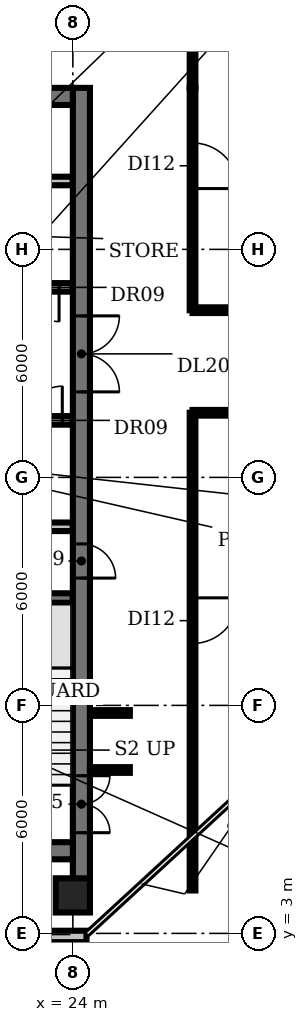
"""IFC4 building model, lengths in metres.
Left out: names, types, materials, properties, quantities, classifications, styles, units other than length and angle.
Written with IfcOpenShell. Run it as: python <this file> out.ifc"""

import sys

from ifc_helpers import new_model, si_unit, direction, frame, frame_2d, origin, origin_2d, place, context, subcontext, project, spatial, rectangle, circle, extrude, element, fill, save


model = new_model("IFC4")
c1 = context("Model", 3, precision=1e-05, world=origin(), true_north=direction((0.0, 1.0)))
c2 = subcontext(c1, "Body", "Model", "MODEL_VIEW")
j1 = project(units=[si_unit("LENGTHUNIT", "METRE"), si_unit("PLANEANGLEUNIT", "RADIAN")], contexts=[c1])
p1 = place(None, origin())
s1 = spatial("IfcSite", under=j1, at=p1, CompositionType="ELEMENT")
p2 = place(p1, origin())
s2 = spatial("IfcBuilding", under=s1, at=p2, CompositionType="ELEMENT")
p3 = place(p2, frame((0.0, 0.0, 209.6)))
s3 = spatial("IfcBuildingStorey", under=s2, at=p3, CompositionType="ELEMENT", Elevation=209.6)
p4 = place(p3, frame((24.0, 4.0, 0.0), z_axis=(0.0, 0.0, 1.0), x_axis=(1.0, 0.0, 0.0)))
e1 = element("IfcColumn", 1, at=p4, inside=s3, PredefinedType="COLUMN", context=c2, shape_type="SweptSolid", body=[
    extrude(circle(Radius=0.45, at=origin_2d()), origin(), (0.0, 0.0, 1.0), 3.8),
])
p5 = place(p3, frame((15.866, 2.92, 0.0), z_axis=(0.0, 0.0, 1.0), x_axis=(1.0, 0.0, 0.0)))
e2 = element("IfcWall", 2, at=p5, inside=s3, PredefinedType="SOLIDWALL", context=c2, shape_type="SweptSolid", body=[
    extrude(rectangle(XDim=8.493, YDim=0.3, at=frame_2d((4.246, 0.0))), origin(), (0.0, 0.0, 1.0), 3.8),
])
p6 = place(p3, frame((20.85, 11.825, 0.0), z_axis=(0.0, 0.0, 1.0), x_axis=(1.0, 0.0, 0.0)))
e3 = element("IfcWall", 3, at=p6, inside=s3, PredefinedType="SHEAR", context=c2, shape_type="SweptSolid", body=[
    extrude(rectangle(XDim=3.15, YDim=0.25, at=frame_2d((1.575, 0.0))), origin(), (0.0, 0.0, 1.0), 3.8),
])
p7 = place(p3, frame((16.6, 13.7, 0.0), z_axis=(0.0, 0.0, 1.0), x_axis=(1.0, 0.0, 0.0)))
e4 = element("IfcWall", 4, at=p7, inside=s3, PredefinedType="PARTITIONING", context=c2, shape_type="SweptSolid", body=[
    extrude(rectangle(XDim=7.4, YDim=0.225, at=frame_2d((3.7, 0.0))), origin(), (0.0, 0.0, 1.0), 3.8),
])
p8 = place(p3, frame((9.4, 16.5, 0.0), z_axis=(0.0, 0.0, 1.0), x_axis=(1.0, 0.0, 0.0)))
e5 = element("IfcWall", 5, at=p8, inside=s3, PredefinedType="PARTITIONING", context=c2, shape_type="SweptSolid", body=[
    extrude(rectangle(XDim=14.6, YDim=0.225, at=frame_2d((7.3, 0.0))), origin(), (0.0, 0.0, 1.0), 3.8),
])
p9 = place(p8, frame((0.55, 0.0, 0.0)))
e6 = element("IfcOpeningElement", 6, at=p9, cuts=e5, PredefinedType="OPENING", context=c2, shape_type="SweptSolid", body=[
    extrude(rectangle(XDim=0.9, YDim=2.1, at=frame_2d((0.45, 1.05))), frame((0.0, 0.123, 0.0), z_axis=(0.0, -1.0, 0.0), x_axis=(1.0, 0.0, 0.0)), (0.0, 0.0, 1.0), 0.245),
])
p10 = place(p8, frame((6.075, 0.0, 0.0)))
e7 = element("IfcOpeningElement", 7, at=p10, cuts=e5, PredefinedType="OPENING", context=c2, shape_type="SweptSolid", body=[
    extrude(rectangle(XDim=1.0, YDim=2.1, at=frame_2d((0.5, 1.05))), frame((0.0, 0.123, 0.0), z_axis=(0.0, -1.0, 0.0), x_axis=(1.0, 0.0, 0.0)), (0.0, 0.0, 1.0), 0.245),
])
p11 = place(p8, frame((11.647, 0.0, 0.0)))
e8 = element("IfcOpeningElement", 8, at=p11, cuts=e5, PredefinedType="OPENING", context=c2, shape_type="SweptSolid", body=[
    extrude(rectangle(XDim=0.9, YDim=2.1, at=frame_2d((0.45, 1.05))), frame((0.0, 0.123, 0.0), z_axis=(0.0, -1.0, 0.0), x_axis=(1.0, 0.0, 0.0)), (0.0, 0.0, 1.0), 0.245),
])
p12 = place(p8, frame((13.423, 0.0, 0.0)))
e9 = element("IfcOpeningElement", 9, at=p12, cuts=e5, PredefinedType="OPENING", context=c2, shape_type="SweptSolid", body=[
    extrude(rectangle(XDim=0.9, YDim=2.1, at=frame_2d((0.45, 1.05))), frame((0.0, 0.123, 0.0), z_axis=(0.0, -1.0, 0.0), x_axis=(1.0, 0.0, 0.0)), (0.0, 0.0, 1.0), 0.245),
])
p13 = place(p3, frame((24.0, 20.0, 0.0), z_axis=(0.0, 0.0, 1.0), x_axis=(-1.0, 0.0, 0.0)))
e10 = element("IfcWall", 10, at=p13, inside=s3, PredefinedType="PARTITIONING", context=c2, shape_type="SweptSolid", body=[
    extrude(rectangle(XDim=14.6, YDim=0.225, at=frame_2d((7.3, 0.0))), origin(), (0.0, 0.0, 1.0), 3.8),
])
p14 = place(p13, frame((12.75, 0.0, 0.0)))
e11 = element("IfcOpeningElement", 11, at=p14, cuts=e10, PredefinedType="OPENING", context=c2, shape_type="SweptSolid", body=[
    extrude(rectangle(XDim=1.1, YDim=2.1, at=frame_2d((0.55, 1.05))), frame((0.0, 0.123, 0.0), z_axis=(0.0, -1.0, 0.0), x_axis=(1.0, 0.0, 0.0)), (0.0, 0.0, 1.0), 0.245),
])
p15 = place(p13, frame((9.95, 0.0, 0.0)))
e12 = element("IfcOpeningElement", 12, at=p15, cuts=e10, PredefinedType="OPENING", context=c2, shape_type="SweptSolid", body=[
    extrude(rectangle(XDim=1.1, YDim=2.1, at=frame_2d((0.55, 1.05))), frame((0.0, 0.123, 0.0), z_axis=(0.0, -1.0, 0.0), x_axis=(1.0, 0.0, 0.0)), (0.0, 0.0, 1.0), 0.245),
])
p16 = place(p13, frame((7.15, 0.0, 0.0)))
e13 = element("IfcOpeningElement", 13, at=p16, cuts=e10, PredefinedType="OPENING", context=c2, shape_type="SweptSolid", body=[
    extrude(rectangle(XDim=1.1, YDim=2.1, at=frame_2d((0.55, 1.05))), frame((0.0, 0.123, 0.0), z_axis=(0.0, -1.0, 0.0), x_axis=(1.0, 0.0, 0.0)), (0.0, 0.0, 1.0), 0.245),
])
p17 = place(p13, frame((4.35, 0.0, 0.0)))
e14 = element("IfcOpeningElement", 14, at=p17, cuts=e10, PredefinedType="OPENING", context=c2, shape_type="SweptSolid", body=[
    extrude(rectangle(XDim=1.1, YDim=2.1, at=frame_2d((0.55, 1.05))), frame((0.0, 0.123, 0.0), z_axis=(0.0, -1.0, 0.0), x_axis=(1.0, 0.0, 0.0)), (0.0, 0.0, 1.0), 0.245),
])
p18 = place(p13, frame((2.137, 0.0, 0.0)))
e15 = element("IfcOpeningElement", 15, at=p18, cuts=e10, PredefinedType="OPENING", context=c2, shape_type="SweptSolid", body=[
    extrude(rectangle(XDim=0.9, YDim=2.1, at=frame_2d((0.45, 1.05))), frame((0.0, 0.123, 0.0), z_axis=(0.0, -1.0, 0.0), x_axis=(1.0, 0.0, 0.0)), (0.0, 0.0, 1.0), 0.245),
])
p19 = place(p13, frame((0.363, 0.0, 0.0)))
e16 = element("IfcOpeningElement", 16, at=p19, cuts=e10, PredefinedType="OPENING", context=c2, shape_type="SweptSolid", body=[
    extrude(rectangle(XDim=0.9, YDim=2.1, at=frame_2d((0.45, 1.05))), frame((0.0, 0.123, 0.0), z_axis=(0.0, -1.0, 0.0), x_axis=(1.0, 0.0, 0.0)), (0.0, 0.0, 1.0), 0.245),
])
p20 = place(p3, frame((9.4, 22.8, 0.0), z_axis=(0.0, 0.0, 1.0), x_axis=(1.0, 0.0, 0.0)))
e17 = element("IfcWall", 17, at=p20, inside=s3, PredefinedType="PARTITIONING", context=c2, shape_type="SweptSolid", body=[
    extrude(rectangle(XDim=14.6, YDim=0.225, at=frame_2d((7.3, 0.0))), origin(), (0.0, 0.0, 1.0), 3.8),
])
p21 = place(p3, frame((24.225, 25.25, 0.0), z_axis=(0.0, 0.0, 1.0), x_axis=(0.0, -1.0, 0.0)))
e18 = element("IfcWall", 18, at=p21, inside=s3, PredefinedType="SHEAR", context=c2, shape_type="SweptSolid", body=[
    extrude(rectangle(XDim=20.83, YDim=0.45, at=frame_2d((10.415, 0.0))), origin(), (0.0, 0.0, 1.0), 3.8),
])
p22 = place(p21, frame((18.1, 0.0, 0.0)))
e19 = element("IfcOpeningElement", 19, at=p22, cuts=e18, PredefinedType="OPENING", context=c2, shape_type="SweptSolid", body=[
    extrude(rectangle(XDim=1.5, YDim=2.1, at=frame_2d((0.75, 1.05))), frame((0.0, 0.235, 0.0), z_axis=(0.0, -1.0, 0.0), x_axis=(1.0, 0.0, 0.0)), (0.0, 0.0, 1.0), 0.47),
])
p23 = place(p21, frame((12.0, 0.0, 0.0)))
e20 = element("IfcOpeningElement", 20, at=p23, cuts=e18, PredefinedType="OPENING", context=c2, shape_type="SweptSolid", body=[
    extrude(rectangle(XDim=0.9, YDim=2.1, at=frame_2d((0.45, 1.05))), frame((0.0, 0.235, 0.0), z_axis=(0.0, -1.0, 0.0), x_axis=(1.0, 0.0, 0.0)), (0.0, 0.0, 1.0), 0.47),
])
p24 = place(p21, frame((6.0, 0.0, 0.0)))
e21 = element("IfcOpeningElement", 21, at=p24, cuts=e18, PredefinedType="OPENING", context=c2, shape_type="SweptSolid", body=[
    extrude(rectangle(XDim=2.0, YDim=2.1, at=frame_2d((1.0, 1.05))), frame((0.0, 0.235, 0.0), z_axis=(0.0, -1.0, 0.0), x_axis=(1.0, 0.0, 0.0)), (0.0, 0.0, 1.0), 0.47),
])
p25 = place(p3, frame((24.0, 5.175, 0.0), z_axis=(0.0, 0.0, 1.0), x_axis=(-1.0, 0.0, 0.0)))
e22 = element("IfcWall", 22, at=p25, inside=s3, PredefinedType="SHEAR", context=c2, shape_type="SweptSolid", body=[
    extrude(rectangle(XDim=18.0, YDim=0.45, at=frame_2d((9.0, 0.0))), origin(), (0.0, 0.0, 1.0), 3.8),
])
p26 = place(p25, frame((0.825, 0.0, 0.0)))
e23 = element("IfcOpeningElement", 23, at=p26, cuts=e22, PredefinedType="OPENING", context=c2, shape_type="SweptSolid", body=[
    extrude(rectangle(XDim=1.5, YDim=2.1, at=frame_2d((0.75, 1.05))), frame((0.0, 0.235, 0.0), z_axis=(0.0, -1.0, 0.0), x_axis=(1.0, 0.0, 0.0)), (0.0, 0.0, 1.0), 0.47),
])
p27 = place(p25, frame((15.675, 0.0, 0.0)))
e24 = element("IfcOpeningElement", 24, at=p27, cuts=e22, PredefinedType="OPENING", context=c2, shape_type="SweptSolid", body=[
    extrude(rectangle(XDim=1.5, YDim=2.1, at=frame_2d((0.75, 1.05))), frame((0.0, 0.235, 0.0), z_axis=(0.0, -1.0, 0.0), x_axis=(1.0, 0.0, 0.0)), (0.0, 0.0, 1.0), 0.47),
])
p28 = place(p25, frame((13.0, 0.0, 0.0)))
e25 = element("IfcOpeningElement", 25, at=p28, cuts=e22, PredefinedType="OPENING", context=c2, shape_type="SweptSolid", body=[
    extrude(rectangle(XDim=1.2, YDim=2.1, at=frame_2d((0.6, 1.05))), frame((0.0, 0.235, 0.0), z_axis=(0.0, -1.0, 0.0), x_axis=(1.0, 0.0, 0.0)), (0.0, 0.0, 1.0), 0.47),
])
p29 = place(p25, frame((4.4, 0.0, 0.0)))
e26 = element("IfcOpeningElement", 26, at=p29, cuts=e22, PredefinedType="OPENING", context=c2, shape_type="SweptSolid", body=[
    extrude(rectangle(XDim=1.0, YDim=2.1, at=frame_2d((0.5, 1.05))), frame((0.0, 0.235, 0.0), z_axis=(0.0, -1.0, 0.0), x_axis=(1.0, 0.0, 0.0)), (0.0, 0.0, 1.0), 0.47),
])
p30 = place(p3, frame((6.0, 25.025, 0.0), z_axis=(0.0, 0.0, 1.0), x_axis=(1.0, 0.0, 0.0)))
e27 = element("IfcWall", 27, at=p30, inside=s3, PredefinedType="SHEAR", context=c2, shape_type="SweptSolid", body=[
    extrude(rectangle(XDim=18.0, YDim=0.45, at=frame_2d((9.0, 0.0))), origin(), (0.0, 0.0, 1.0), 3.8),
])
for number, where, z_axis, x_axis in (
    (28, (24.45, 7.3, 0.0), (0.0, 0.0, 1.0), (1.0, 0.0, 0.0)),
    (29, (24.45, 8.8, 0.0), (0.0, 0.0, 1.0), (1.0, 0.0, 0.0)),
):
    element("IfcWall", number, at=place(p3, frame(where, z_axis=z_axis, x_axis=x_axis)), inside=s3, PredefinedType="PARTITIONING", context=c2, shape_type="SweptSolid", body=[
        extrude(rectangle(XDim=1.05, YDim=0.15, at=frame_2d((0.525, 0.0))), origin(), (0.0, 0.0, 1.0), 2.83),
    ])
p31 = place(p3, frame((27.15, 16.7, 0.0), z_axis=(0.0, 0.0, 1.0), x_axis=(0.0, -1.0, 0.0)))
e30 = element("IfcWall", 30, at=p31, inside=s3, PredefinedType="PARTITIONING", context=c2, shape_type="SweptSolid", body=[
    extrude(rectangle(XDim=12.57, YDim=0.15, at=frame_2d((6.285, 0.0))), origin(), (0.0, 0.0, 1.0), 2.83),
])
p32 = place(p31, frame((4.87, 0.0, 0.0)))
e31 = element("IfcOpeningElement", 31, at=p32, cuts=e30, PredefinedType="OPENING", context=c2, shape_type="SweptSolid", body=[
    extrude(rectangle(XDim=1.2, YDim=2.1, at=frame_2d((0.6, 1.05))), frame((0.0, 0.085, 0.0), z_axis=(0.0, -1.0, 0.0), x_axis=(1.0, 0.0, 0.0)), (0.0, 0.0, 1.0), 0.17),
])
p33 = place(p3, frame((27.15, 16.7, 0.0), z_axis=(0.0, 0.0, 1.0), x_axis=(1.0, 0.0, 0.0)))
e32 = element("IfcWall", 32, at=p33, inside=s3, PredefinedType="PARTITIONING", context=c2, shape_type="SweptSolid", body=[
    extrude(rectangle(XDim=5.542, YDim=0.15, at=frame_2d((2.771, 0.0))), origin(), (0.0, 0.0, 1.0), 2.83),
])
p34 = place(p3, frame((27.15, 19.4, 0.0), z_axis=(0.0, 0.0, 1.0), x_axis=(1.0, 0.0, 0.0)))
e33 = element("IfcWall", 33, at=p34, inside=s3, PredefinedType="PARTITIONING", context=c2, shape_type="SweptSolid", body=[
    extrude(rectangle(XDim=5.33, YDim=0.15, at=frame_2d((2.665, 0.0))), origin(), (0.0, 0.0, 1.0), 2.83),
])
p35 = place(p3, frame((27.15, 25.25, 0.0), z_axis=(0.0, 0.0, 1.0), x_axis=(0.0, -1.0, 0.0)))
e34 = element("IfcWall", 34, at=p35, inside=s3, PredefinedType="PARTITIONING", context=c2, shape_type="SweptSolid", body=[
    extrude(rectangle(XDim=5.85, YDim=0.15, at=frame_2d((2.925, 0.0))), origin(), (0.0, 0.0, 1.0), 2.83),
])
p36 = place(p35, frame((1.45, 0.0, 0.0)))
e35 = element("IfcOpeningElement", 35, at=p36, cuts=e34, PredefinedType="OPENING", context=c2, shape_type="SweptSolid", body=[
    extrude(rectangle(XDim=1.2, YDim=2.1, at=frame_2d((0.6, 1.05))), frame((0.0, 0.085, 0.0), z_axis=(0.0, -1.0, 0.0), x_axis=(1.0, 0.0, 0.0)), (0.0, 0.0, 1.0), 0.17),
])
p37 = place(p3, frame((27.15, 25.25, 0.0), z_axis=(0.0, 0.0, 1.0), x_axis=(0.0, 1.0, 0.0)))
e36 = element("IfcWall", 36, at=p37, inside=s3, PredefinedType="PARTITIONING", context=c2, shape_type="SweptSolid", body=[
    extrude(rectangle(XDim=2.7, YDim=0.15, at=frame_2d((1.35, 0.0))), origin(), (0.0, 0.0, 1.0), 2.83),
])
p38 = place(p12, origin())
e37 = element("IfcDoor", 37, at=p38, inside=s3, OperationType="SINGLE_SWING_RIGHT", PredefinedType="DOOR", context=c2, shape_type="SweptSolid", body=[
    extrude(rectangle(XDim=0.9, YDim=2.1, at=frame_2d((0.45, 1.05))), frame((0.0, 0.025, 0.0), z_axis=(0.0, -1.0, 0.0), x_axis=(1.0, 0.0, 0.0)), (0.0, 0.0, 1.0), 0.05),
])
fill(e9, e37)
p39 = place(p19, origin())
e38 = element("IfcDoor", 38, at=p39, inside=s3, OperationType="SINGLE_SWING_LEFT", PredefinedType="DOOR", context=c2, shape_type="SweptSolid", body=[
    extrude(rectangle(XDim=0.9, YDim=2.1, at=frame_2d((0.45, 1.05))), frame((0.0, 0.025, 0.0), z_axis=(0.0, -1.0, 0.0), x_axis=(1.0, 0.0, 0.0)), (0.0, 0.0, 1.0), 0.05),
])
fill(e16, e38)
p40 = place(p22, origin())
e39 = element("IfcDoor", 39, at=p40, inside=s3, OperationType="DOUBLE_DOOR_SINGLE_SWING", PredefinedType="DOOR", context=c2, shape_type="SweptSolid", body=[
    extrude(rectangle(XDim=1.5, YDim=2.1, at=frame_2d((0.75, 1.05))), frame((0.0, 0.025, 0.0), z_axis=(0.0, -1.0, 0.0), x_axis=(1.0, 0.0, 0.0)), (0.0, 0.0, 1.0), 0.05),
])
fill(e19, e39)
p41 = place(p23, origin())
e40 = element("IfcDoor", 40, at=p41, inside=s3, OperationType="SINGLE_SWING_RIGHT", PredefinedType="DOOR", context=c2, shape_type="SweptSolid", body=[
    extrude(rectangle(XDim=0.9, YDim=2.1, at=frame_2d((0.45, 1.05))), frame((0.0, 0.025, 0.0), z_axis=(0.0, -1.0, 0.0), x_axis=(1.0, 0.0, 0.0)), (0.0, 0.0, 1.0), 0.05),
])
fill(e20, e40)
p42 = place(p24, origin())
e41 = element("IfcDoor", 41, at=p42, inside=s3, OperationType="DOUBLE_DOOR_SINGLE_SWING", PredefinedType="DOOR", context=c2, shape_type="SweptSolid", body=[
    extrude(rectangle(XDim=2.0, YDim=2.1, at=frame_2d((1.0, 1.05))), frame((0.0, 0.025, 0.0), z_axis=(0.0, -1.0, 0.0), x_axis=(1.0, 0.0, 0.0)), (0.0, 0.0, 1.0), 0.05),
])
fill(e21, e41)
p43 = place(p32, origin())
e42 = element("IfcDoor", 42, at=p43, inside=s3, OperationType="SINGLE_SWING_LEFT", PredefinedType="DOOR", context=c2, shape_type="SweptSolid", body=[
    extrude(rectangle(XDim=1.2, YDim=2.1, at=frame_2d((0.6, 1.05))), frame((0.0, 0.025, 0.0), z_axis=(0.0, -1.0, 0.0), x_axis=(1.0, 0.0, 0.0)), (0.0, 0.0, 1.0), 0.05),
])
fill(e31, e42)
p44 = place(p36, origin())
e43 = element("IfcDoor", 43, at=p44, inside=s3, OperationType="SINGLE_SWING_RIGHT", PredefinedType="DOOR", context=c2, shape_type="SweptSolid", body=[
    extrude(rectangle(XDim=1.2, YDim=2.1, at=frame_2d((0.6, 1.05))), frame((0.0, 0.025, 0.0), z_axis=(0.0, -1.0, 0.0), x_axis=(1.0, 0.0, 0.0)), (0.0, 0.0, 1.0), 0.05),
])
fill(e35, e43)
save(model, sys.argv[1])
